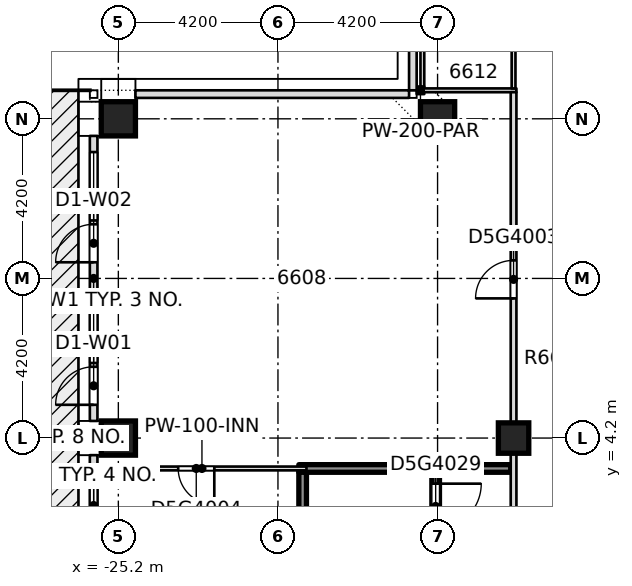
"""IFC4 building model, lengths in metres.
Left out: names, types, materials, properties, quantities, classifications, styles, units other than length and angle.
Written with IfcOpenShell. Run it as: python <this file> out.ifc"""

import sys

from ifc_helpers import new_model, si_unit, direction, frame, frame_2d, origin, origin_2d, place, context, subcontext, project, spatial, rectangle, extrude, element, fill, save


model = new_model("IFC4")
c1 = context("Model", 3, precision=1e-05, world=origin(), true_north=direction((0.0, 1.0)))
c2 = subcontext(c1, "Body", "Model", "MODEL_VIEW")
j1 = project(units=[si_unit("LENGTHUNIT", "METRE"), si_unit("PLANEANGLEUNIT", "RADIAN")], contexts=[c1])
p1 = place(None, origin())
s1 = spatial("IfcSite", under=j1, at=p1, CompositionType="ELEMENT")
p2 = place(p1, origin())
s2 = spatial("IfcBuilding", under=s1, at=p2, CompositionType="ELEMENT")
p3 = place(p2, frame((0.0, 0.0, 251.05)))
s3 = spatial("IfcBuildingStorey", under=s2, at=p3, CompositionType="ELEMENT", Elevation=251.05)
for number, where, z_axis, x_axis in (
    (1, (-25.2, 4.2, -0.4), (0.0, 0.0, 1.0), (1.0, 0.0, 0.0)),
    (2, (-25.2, 12.6, -0.4), (0.0, 0.0, 1.0), (1.0, 0.0, 0.0)),
    (3, (-16.8, 12.6, -0.4), (0.0, 0.0, 1.0), (1.0, 0.0, 0.0)),
):
    element("IfcColumn", number, at=place(p3, frame(where, z_axis=z_axis, x_axis=x_axis)), inside=s3, PredefinedType="COLUMN", context=c2, shape_type="SweptSolid", body=[
        extrude(rectangle(XDim=0.9, YDim=0.9, at=origin_2d()), origin(), (0.0, 0.0, 1.0), 3.45),
    ])
p4 = place(p3, frame((-14.8, 4.2, -0.4), z_axis=(0.0, 0.0, 1.0), x_axis=(1.0, 0.0, 0.0)))
e4 = element("IfcColumn", 4, at=p4, inside=s3, PredefinedType="COLUMN", context=c2, shape_type="SweptSolid", body=[
    extrude(rectangle(XDim=0.8, YDim=0.8, at=origin_2d()), origin(), (0.0, 0.0, 1.0), 3.45),
])
p5 = place(p3, frame((-25.75, 3.4, 0.0), z_axis=(0.0, 0.0, 1.0), x_axis=(1.0, 0.0, 0.0)))
e5 = element("IfcWall", 5, at=p5, inside=s3, PredefinedType="PARTITIONING", context=c2, shape_type="SweptSolid", body=[
    extrude(rectangle(XDim=5.5, YDim=0.1, at=frame_2d((2.75, 0.0))), origin(), (0.0, 0.0, 1.0), 3.05),
])
p6 = place(p5, frame((2.125, 0.0, 0.0)))
e6 = element("IfcOpeningElement", 6, at=p6, cuts=e5, PredefinedType="OPENING", context=c2, shape_type="SweptSolid", body=[
    extrude(rectangle(XDim=0.95, YDim=2.1, at=frame_2d((0.475, 1.05))), frame((0.0, 0.06, 0.0), z_axis=(0.0, -1.0, 0.0), x_axis=(1.0, 0.0, 0.0)), (0.0, 0.0, 1.0), 0.12),
])
p7 = place(p3, frame((-20.45, 3.4, 0.0), z_axis=(0.0, 0.0, 1.0), x_axis=(1.0, 0.0, 0.0)))
e7 = element("IfcWall", 7, at=p7, inside=s3, PredefinedType="SOLIDWALL", context=c2, shape_type="SweptSolid", body=[
    extrude(rectangle(XDim=5.575, YDim=0.2, at=frame_2d((2.788, 0.0))), origin(), (0.0, 0.0, 1.0), 3.05),
])
p8 = place(p3, frame((-17.35, 13.35, 0.0), z_axis=(0.0, 0.0, 1.0), x_axis=(1.0, 0.0, 0.0)))
e8 = element("IfcWall", 8, at=p8, inside=s3, PredefinedType="PARTITIONING", context=c2, shape_type="SweptSolid", body=[
    extrude(rectangle(XDim=0.2, YDim=0.2, at=frame_2d((0.1, 0.0))), origin(), (0.0, 0.0, 1.0), 3.05),
])
p9 = place(p3, frame((-17.25, 13.35, 0.0), z_axis=(0.0, 0.0, 1.0), x_axis=(1.0, 0.0, 0.0)))
e9 = element("IfcWall", 9, at=p9, inside=s3, PredefinedType="PARTITIONING", context=c2, shape_type="SweptSolid", body=[
    extrude(rectangle(XDim=2.525, YDim=0.1, at=frame_2d((1.262, 0.0))), origin(), (0.0, 0.0, 1.0), 3.05),
])
p10 = place(p3, frame((-20.35, -0.53, 0.0), z_axis=(0.0, 0.0, 1.0), x_axis=(0.0, 1.0, 0.0)))
e10 = element("IfcWall", 10, at=p10, inside=s3, PredefinedType="SOLIDWALL", context=c2, shape_type="SweptSolid", body=[
    extrude(rectangle(XDim=3.83, YDim=0.2, at=frame_2d((1.915, 0.0))), origin(), (0.0, 0.0, 1.0), 3.05),
])
p11 = place(p3, frame((-17.2, 13.45, 0.0), z_axis=(0.0, 0.0, 1.0), x_axis=(0.0, 1.0, 0.0)))
e11 = element("IfcWall", 11, at=p11, inside=s3, PredefinedType="PARTITIONING", context=c2, shape_type="SweptSolid", body=[
    extrude(rectangle(XDim=1.65, YDim=0.1, at=frame_2d((0.825, 0.0))), origin(), (0.0, 0.0, 1.0), 3.05),
])
p12 = place(p3, frame((-16.85, -3.3, 0.0), z_axis=(0.0, 0.0, 1.0), x_axis=(0.0, 1.0, 0.0)))
e12 = element("IfcWall", 12, at=p12, inside=s3, PredefinedType="SOLIDWALL", context=c2, shape_type="SweptSolid", body=[
    extrude(rectangle(XDim=6.6, YDim=0.2, at=frame_2d((3.3, 0.0))), origin(), (0.0, 0.0, 1.0), 3.05),
])
p13 = place(p12, frame((5.1, 0.0, 0.0)))
e13 = element("IfcOpeningElement", 13, at=p13, cuts=e12, PredefinedType="OPENING", context=c2, shape_type="SweptSolid", body=[
    extrude(rectangle(XDim=1.2, YDim=2.1, at=frame_2d((0.6, 1.05))), frame((0.0, 0.11, 0.0), z_axis=(0.0, -1.0, 0.0), x_axis=(1.0, 0.0, 0.0)), (0.0, 0.0, 1.0), 0.22),
])
p14 = place(p3, frame((-14.8, -5.223, 0.0), z_axis=(0.0, 0.0, 1.0), x_axis=(0.0, 1.0, 0.0)))
e14 = element("IfcWall", 14, at=p14, inside=s3, PredefinedType="PARTITIONING", context=c2, shape_type="SweptSolid", body=[
    extrude(rectangle(XDim=18.523, YDim=0.15, at=frame_2d((9.261, 0.0))), origin(), (0.0, 0.0, 1.0), 3.05),
])
p15 = place(p14, frame((13.098, 0.0, 0.0)))
e15 = element("IfcOpeningElement", 15, at=p15, cuts=e14, PredefinedType="OPENING", context=c2, shape_type="SweptSolid", body=[
    extrude(rectangle(XDim=1.0, YDim=2.1, at=frame_2d((0.5, 1.05))), frame((0.0, 0.085, 0.0), z_axis=(0.0, -1.0, 0.0), x_axis=(1.0, 0.0, 0.0)), (0.0, 0.0, 1.0), 0.17),
])
p16 = place(p14, frame((4.673, 0.0, 0.0)))
e16 = element("IfcOpeningElement", 16, at=p16, cuts=e14, PredefinedType="OPENING", context=c2, shape_type="SweptSolid", body=[
    extrude(rectangle(XDim=1.1, YDim=2.1, at=frame_2d((0.55, 1.05))), frame((0.0, 0.085, 0.0), z_axis=(0.0, -1.0, 0.0), x_axis=(1.0, 0.0, 0.0)), (0.0, 0.0, 1.0), 0.17),
])
p17 = place(p3, frame((-14.8, 13.4, 0.0), z_axis=(0.0, 0.0, 1.0), x_axis=(0.0, 1.0, 0.0)))
e17 = element("IfcWall", 17, at=p17, inside=s3, PredefinedType="PARTITIONING", context=c2, shape_type="SweptSolid", body=[
    extrude(rectangle(XDim=1.7, YDim=0.1, at=frame_2d((0.85, 0.0))), origin(), (0.0, 0.0, 1.0), 3.05),
])
p18 = place(p3, frame((-17.45, 20.55, 0.0), z_axis=(0.0, 0.0, 1.0), x_axis=(0.0, -1.0, 0.0)))
e18 = element("IfcWall", 18, at=p18, inside=s3, PredefinedType="STANDARD", context=c2, shape_type="SweptSolid", body=[
    extrude(rectangle(XDim=7.2, YDim=0.2, at=frame_2d((3.6, 0.0))), origin(), (0.0, 0.0, 1.0), 3.05),
])
p19 = place(p18, frame((4.025, 0.0, 0.2)))
e19 = element("IfcOpeningElement", 19, at=p19, cuts=e18, PredefinedType="OPENING", context=c2, shape_type="SweptSolid", body=[
    extrude(rectangle(XDim=1.8, YDim=2.65, at=frame_2d((0.9, 1.325))), frame((0.0, 0.11, 0.0), z_axis=(0.0, -1.0, 0.0), x_axis=(1.0, 0.0, 0.0)), (0.0, 0.0, 1.0), 0.22),
])
p20 = place(p18, frame((0.425, 0.0, 0.2)))
e20 = element("IfcOpeningElement", 20, at=p20, cuts=e18, PredefinedType="OPENING", context=c2, shape_type="SweptSolid", body=[
    extrude(rectangle(XDim=1.8, YDim=2.65, at=frame_2d((0.9, 1.325))), frame((0.0, 0.11, 0.0), z_axis=(0.0, -1.0, 0.0), x_axis=(1.0, 0.0, 0.0)), (0.0, 0.0, 1.0), 0.22),
])
p21 = place(p3, frame((-17.55, 13.25, 0.0), z_axis=(0.0, 0.0, 1.0), x_axis=(-1.0, 0.0, 0.0)))
e21 = element("IfcWall", 21, at=p21, inside=s3, PredefinedType="STANDARD", context=c2, shape_type="SweptSolid", body=[
    extrude(rectangle(XDim=7.2, YDim=0.2, at=frame_2d((3.6, 0.0))), origin(), (0.0, 0.0, 1.0), 3.05),
])
p22 = place(p3, frame((-25.85, 12.15, 0.0), z_axis=(0.0, 0.0, 1.0), x_axis=(0.0, -1.0, 0.0)))
e22 = element("IfcWall", 22, at=p22, inside=s3, PredefinedType="STANDARD", context=c2, shape_type="SweptSolid", body=[
    extrude(rectangle(XDim=7.5, YDim=0.2, at=frame_2d((3.75, 0.0))), origin(), (0.0, 0.0, 1.0), 3.05),
])
p23 = place(p22, frame((4.175, 0.0, 0.2)))
e23 = element("IfcOpeningElement", 23, at=p23, cuts=e22, PredefinedType="OPENING", context=c2, shape_type="SweptSolid", body=[
    extrude(rectangle(XDim=1.8, YDim=2.65, at=frame_2d((0.9, 1.325))), frame((0.0, 0.11, 0.0), z_axis=(0.0, -1.0, 0.0), x_axis=(1.0, 0.0, 0.0)), (0.0, 0.0, 1.0), 0.22),
])
p24 = place(p22, frame((6.075, 0.0, 0.0)))
e24 = element("IfcOpeningElement", 24, at=p24, cuts=e22, PredefinedType="OPENING", context=c2, shape_type="SweptSolid", body=[
    extrude(rectangle(XDim=1.0, YDim=2.4, at=frame_2d((0.5, 1.2))), frame((0.0, 0.11, 0.0), z_axis=(0.0, -1.0, 0.0), x_axis=(1.0, 0.0, 0.0)), (0.0, 0.0, 1.0), 0.22),
])
p25 = place(p22, frame((0.425, 0.0, 0.2)))
e25 = element("IfcOpeningElement", 25, at=p25, cuts=e22, PredefinedType="OPENING", context=c2, shape_type="SweptSolid", body=[
    extrude(rectangle(XDim=1.8, YDim=2.65, at=frame_2d((0.9, 1.325))), frame((0.0, 0.11, 0.0), z_axis=(0.0, -1.0, 0.0), x_axis=(1.0, 0.0, 0.0)), (0.0, 0.0, 1.0), 0.22),
])
p26 = place(p22, frame((2.325, 0.0, 0.0)))
e26 = element("IfcOpeningElement", 26, at=p26, cuts=e22, PredefinedType="OPENING", context=c2, shape_type="SweptSolid", body=[
    extrude(rectangle(XDim=1.0, YDim=2.4, at=frame_2d((0.5, 1.2))), frame((0.0, 0.11, 0.0), z_axis=(0.0, -1.0, 0.0), x_axis=(1.0, 0.0, 0.0)), (0.0, 0.0, 1.0), 0.22),
])
p27 = place(p3, frame((-25.85, 3.75, 0.0), z_axis=(0.0, 0.0, 1.0), x_axis=(0.0, -1.0, 0.0)))
e27 = element("IfcWall", 27, at=p27, inside=s3, PredefinedType="STANDARD", context=c2, shape_type="SweptSolid", body=[
    extrude(rectangle(XDim=7.5, YDim=0.2, at=frame_2d((3.75, 0.0))), origin(), (0.0, 0.0, 1.0), 3.05),
])
p28 = place(p27, frame((4.175, 0.0, 0.2)))
e28 = element("IfcOpeningElement", 28, at=p28, cuts=e27, PredefinedType="OPENING", context=c2, shape_type="SweptSolid", body=[
    extrude(rectangle(XDim=1.8, YDim=2.65, at=frame_2d((0.9, 1.325))), frame((0.0, 0.11, 0.0), z_axis=(0.0, -1.0, 0.0), x_axis=(1.0, 0.0, 0.0)), (0.0, 0.0, 1.0), 0.22),
])
p29 = place(p27, frame((6.075, 0.0, 0.0)))
e29 = element("IfcOpeningElement", 29, at=p29, cuts=e27, PredefinedType="OPENING", context=c2, shape_type="SweptSolid", body=[
    extrude(rectangle(XDim=1.0, YDim=2.4, at=frame_2d((0.5, 1.2))), frame((0.0, 0.11, 0.0), z_axis=(0.0, -1.0, 0.0), x_axis=(1.0, 0.0, 0.0)), (0.0, 0.0, 1.0), 0.22),
])
p30 = place(p27, frame((0.425, 0.0, 0.2)))
e30 = element("IfcOpeningElement", 30, at=p30, cuts=e27, PredefinedType="OPENING", context=c2, shape_type="SweptSolid", body=[
    extrude(rectangle(XDim=1.8, YDim=2.65, at=frame_2d((0.9, 1.325))), frame((0.0, 0.11, 0.0), z_axis=(0.0, -1.0, 0.0), x_axis=(1.0, 0.0, 0.0)), (0.0, 0.0, 1.0), 0.22),
])
p31 = place(p27, frame((2.325, 0.0, 0.0)))
e31 = element("IfcOpeningElement", 31, at=p31, cuts=e27, PredefinedType="OPENING", context=c2, shape_type="SweptSolid", body=[
    extrude(rectangle(XDim=1.0, YDim=2.4, at=frame_2d((0.5, 1.2))), frame((0.0, 0.11, 0.0), z_axis=(0.0, -1.0, 0.0), x_axis=(1.0, 0.0, 0.0)), (0.0, 0.0, 1.0), 0.22),
])
p32 = place(p15, origin())
e32 = element("IfcDoor", 32, at=p32, inside=s3, OperationType="SINGLE_SWING_LEFT", PredefinedType="DOOR", context=c2, shape_type="SweptSolid", body=[
    extrude(rectangle(XDim=1.0, YDim=2.1, at=frame_2d((0.5, 1.05))), frame((0.0, 0.025, 0.0), z_axis=(0.0, -1.0, 0.0), x_axis=(1.0, 0.0, 0.0)), (0.0, 0.0, 1.0), 0.05),
])
fill(e15, e32)
p33 = place(p6, origin())
e33 = element("IfcDoor", 33, at=p33, inside=s3, OperationType="SINGLE_SWING_LEFT", PredefinedType="DOOR", context=c2, shape_type="SweptSolid", body=[
    extrude(rectangle(XDim=0.95, YDim=2.1, at=frame_2d((0.475, 1.05))), frame((0.0, 0.025, 0.0), z_axis=(0.0, -1.0, 0.0), x_axis=(1.0, 0.0, 0.0)), (0.0, 0.0, 1.0), 0.05),
])
fill(e6, e33)
p34 = place(p13, origin())
e34 = element("IfcDoor", 34, at=p34, inside=s3, OperationType="SINGLE_SWING_RIGHT", PredefinedType="DOOR", context=c2, shape_type="SweptSolid", body=[
    extrude(rectangle(XDim=1.2, YDim=2.1, at=frame_2d((0.6, 1.05))), frame((0.0, 0.025, 0.0), z_axis=(0.0, -1.0, 0.0), x_axis=(1.0, 0.0, 0.0)), (0.0, 0.0, 1.0), 0.05),
])
fill(e13, e34)
p35 = place(p23, origin())
e35 = element("IfcWindow", 35, at=p35, inside=s3, PartitioningType="SINGLE_PANEL", PredefinedType="WINDOW", context=c2, shape_type="SweptSolid", body=[
    extrude(rectangle(XDim=1.8, YDim=2.65, at=frame_2d((0.9, 1.325))), frame((0.0, 0.03, 0.0), z_axis=(0.0, -1.0, 0.0), x_axis=(1.0, 0.0, 0.0)), (0.0, 0.0, 1.0), 0.06),
])
fill(e23, e35)
p36 = place(p24, origin())
e36 = element("IfcDoor", 36, at=p36, inside=s3, OperationType="SINGLE_SWING_LEFT", PredefinedType="DOOR", context=c2, shape_type="SweptSolid", body=[
    extrude(rectangle(XDim=1.0, YDim=2.4, at=frame_2d((0.5, 1.2))), frame((0.0, 0.025, 0.0), z_axis=(0.0, -1.0, 0.0), x_axis=(1.0, 0.0, 0.0)), (0.0, 0.0, 1.0), 0.05),
])
fill(e24, e36)
p37 = place(p25, origin())
e37 = element("IfcWindow", 37, at=p37, inside=s3, PartitioningType="SINGLE_PANEL", PredefinedType="WINDOW", context=c2, shape_type="SweptSolid", body=[
    extrude(rectangle(XDim=1.8, YDim=2.65, at=frame_2d((0.9, 1.325))), frame((0.0, 0.03, 0.0), z_axis=(0.0, -1.0, 0.0), x_axis=(1.0, 0.0, 0.0)), (0.0, 0.0, 1.0), 0.06),
])
fill(e25, e37)
p38 = place(p26, origin())
e38 = element("IfcDoor", 38, at=p38, inside=s3, OperationType="SINGLE_SWING_LEFT", PredefinedType="DOOR", context=c2, shape_type="SweptSolid", body=[
    extrude(rectangle(XDim=1.0, YDim=2.4, at=frame_2d((0.5, 1.2))), frame((0.0, 0.025, 0.0), z_axis=(0.0, -1.0, 0.0), x_axis=(1.0, 0.0, 0.0)), (0.0, 0.0, 1.0), 0.05),
])
fill(e26, e38)
p39 = place(p30, origin())
e39 = element("IfcWindow", 39, at=p39, inside=s3, PartitioningType="SINGLE_PANEL", PredefinedType="WINDOW", context=c2, shape_type="SweptSolid", body=[
    extrude(rectangle(XDim=1.8, YDim=2.65, at=frame_2d((0.9, 1.325))), frame((0.0, 0.03, 0.0), z_axis=(0.0, -1.0, 0.0), x_axis=(1.0, 0.0, 0.0)), (0.0, 0.0, 1.0), 0.06),
])
fill(e30, e39)
save(model, sys.argv[1])
